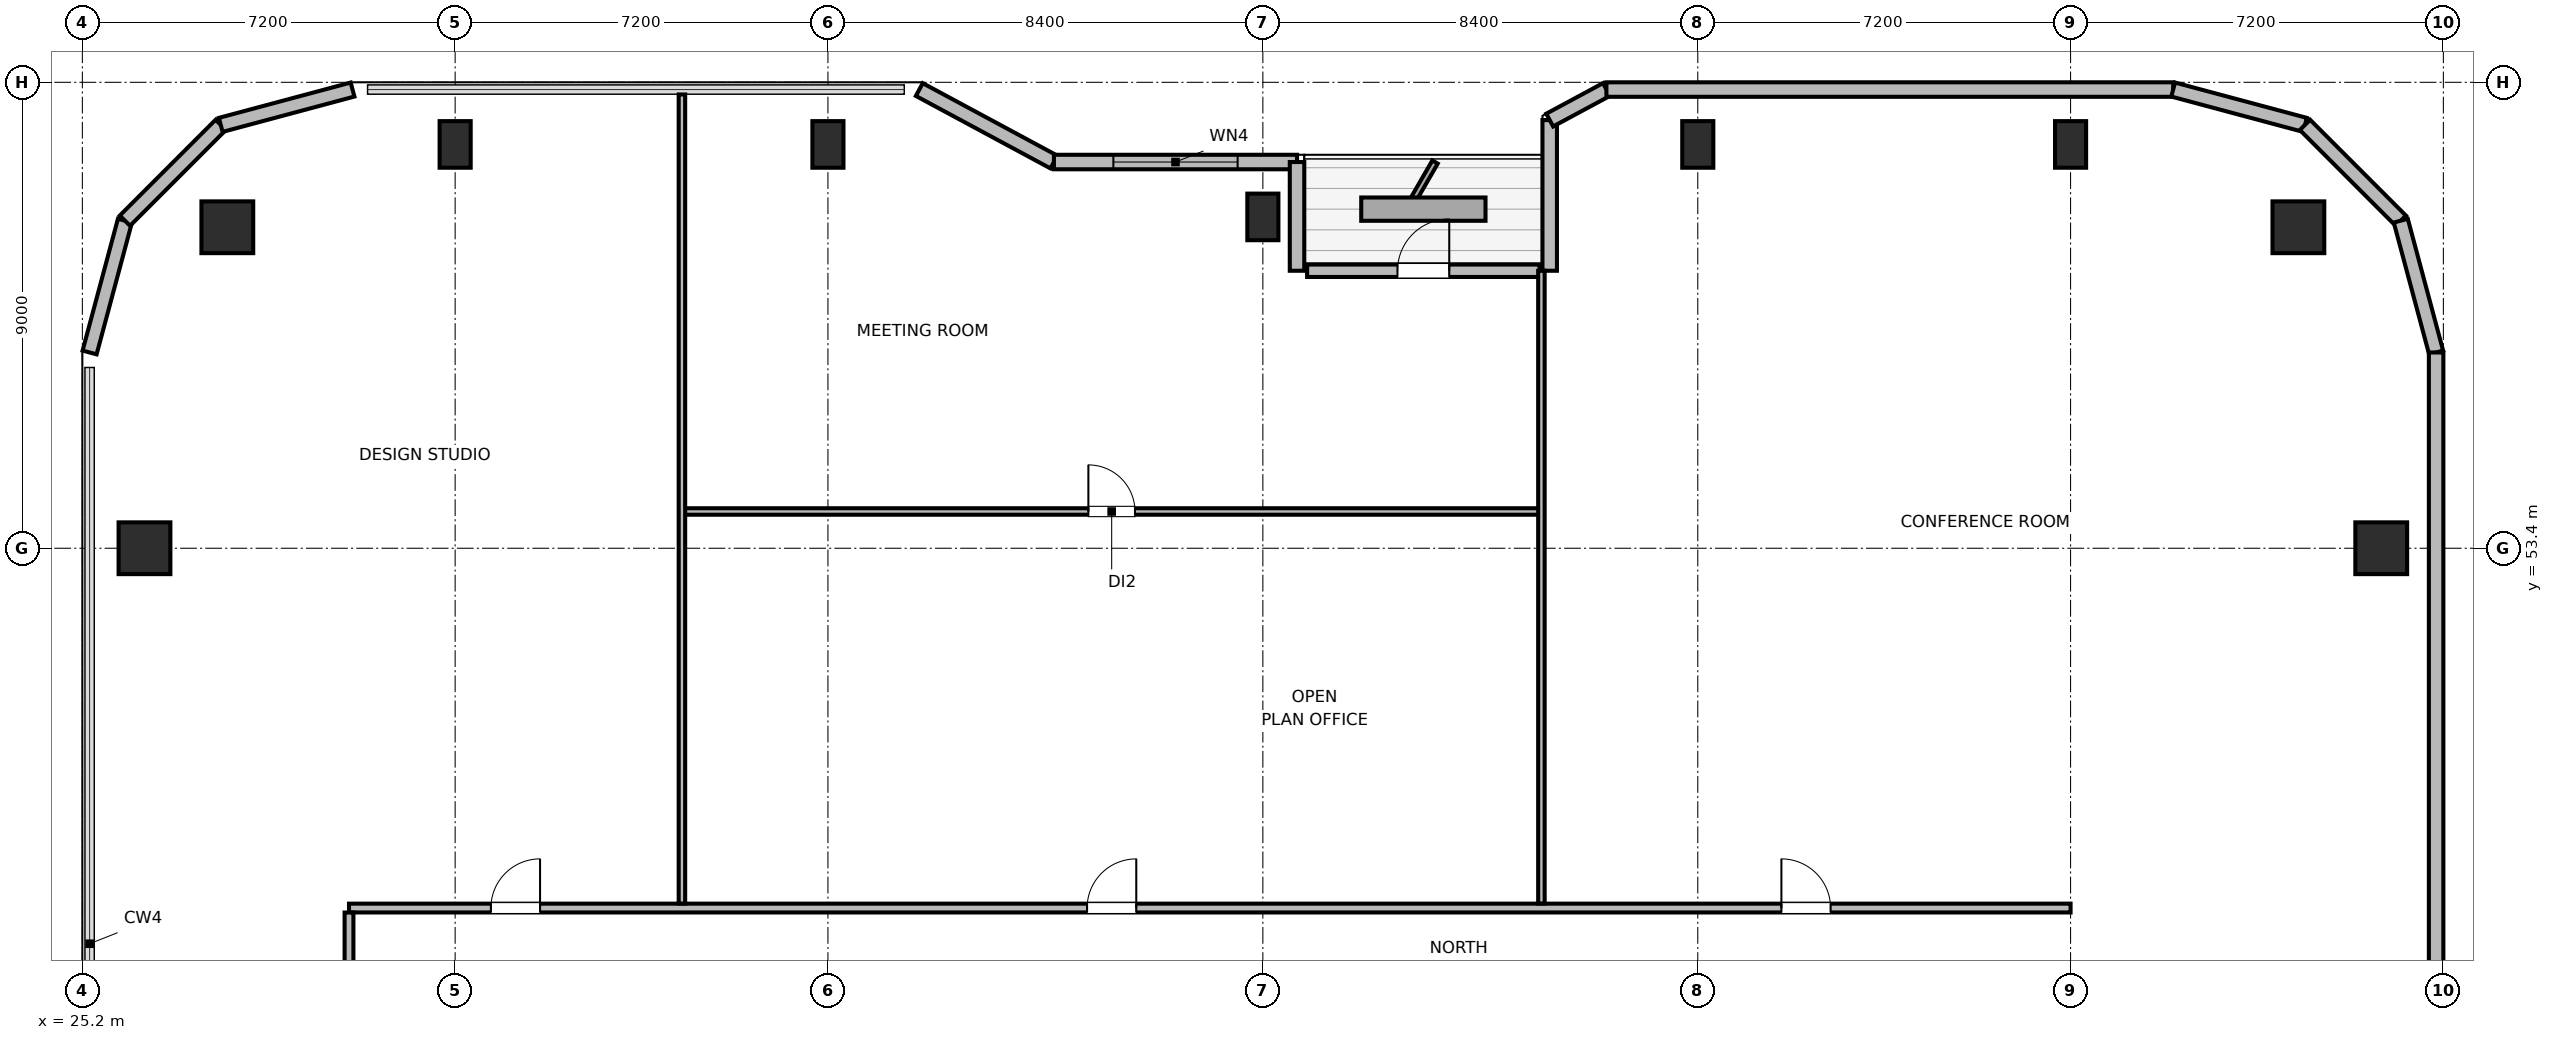
"""IFC4 building model, lengths in metres.
Left out: names, types, materials, properties, quantities, classifications, styles, units other than length and angle.
Written with IfcOpenShell. Run it as: python <this file> out.ifc"""

import sys

from ifc_helpers import new_model, si_unit, direction, frame, frame_2d, origin, origin_2d, place, context, subcontext, project, spatial, rectangle, circle, extrude, element, fill, save


model = new_model("IFC4")
c1 = context("Model", 3, precision=1e-05, world=origin(), true_north=direction((0.0, 1.0)))
c2 = subcontext(c1, "Body", "Model", "MODEL_VIEW")
j1 = project(units=[si_unit("LENGTHUNIT", "METRE"), si_unit("PLANEANGLEUNIT", "RADIAN")], contexts=[c1])
p1 = place(None, origin())
s1 = spatial("IfcSite", under=j1, at=p1, CompositionType="ELEMENT")
p2 = place(p1, origin())
s2 = spatial("IfcBuilding", under=s1, at=p2, CompositionType="ELEMENT")
p3 = place(p2, frame((0.0, 0.0, 231.0)))
s3 = spatial("IfcBuildingStorey", under=s2, at=p3, CompositionType="ELEMENT", Elevation=231.0)
for number, where, z_axis, x_axis in (
    (1, (68.0, 59.6, 0.0), (0.0, 0.0, 1.0), (1.0, 0.0, 0.0)),
    (2, (28.0, 59.6, 0.0), (0.0, 0.0, 1.0), (1.0, 0.0, 0.0)),
):
    element("IfcColumn", number, at=place(p3, frame(where, z_axis=z_axis, x_axis=x_axis)), inside=s3, PredefinedType="COLUMN", context=c2, shape_type="SweptSolid", body=[
        extrude(circle(Radius=0.5, at=origin_2d()), origin(), (0.0, 0.0, 1.0), 3.9),
    ])
for number, where, z_axis, x_axis in (
    (3, (32.4, 61.2, 0.0), (0.0, 0.0, 1.0), (1.0, 0.0, 0.0)),
    (4, (39.6, 61.2, 0.0), (0.0, 0.0, 1.0), (1.0, 0.0, 0.0)),
    (5, (48.0, 59.8, 0.0), (0.0, 0.0, 1.0), (1.0, 0.0, 0.0)),
    (6, (56.4, 61.2, 0.0), (0.0, 0.0, 1.0), (1.0, 0.0, 0.0)),
    (7, (63.6, 61.2, 0.0), (0.0, 0.0, 1.0), (1.0, 0.0, 0.0)),
):
    element("IfcColumn", number, at=place(p3, frame(where, z_axis=z_axis, x_axis=x_axis)), inside=s3, PredefinedType="COLUMN", context=c2, shape_type="SweptSolid", body=[
        extrude(rectangle(XDim=0.6, YDim=0.9, at=origin_2d()), origin(), (0.0, 0.0, 1.0), 3.9),
    ])
for number, where, z_axis, x_axis in (
    (8, (26.4, 53.4, 0.0), (0.0, 0.0, 1.0), (1.0, 0.0, 0.0)),
    (9, (69.6, 53.4, 0.0), (0.0, 0.0, 1.0), (1.0, 0.0, 0.0)),
):
    element("IfcColumn", number, at=place(p3, frame(where, z_axis=z_axis, x_axis=x_axis)), inside=s3, PredefinedType="COLUMN", context=c2, shape_type="SweptSolid", body=[
        extrude(rectangle(XDim=1.0, YDim=1.0, at=origin_2d()), origin(), (0.0, 0.0, 1.0), 3.9),
    ])
p4 = place(p3, frame((25.34, 57.182, 0.0), z_axis=(0.0, 0.0, 1.0), x_axis=(0.2588904131, 0.965906700466, 0.0)))
e10 = element("IfcWall", 10, at=p4, inside=s3, PredefinedType="SOLIDWALL", context=c2, shape_type="SweptSolid", body=[
    extrude(rectangle(XDim=2.636, YDim=0.28, at=frame_2d((1.318, 0.0))), origin(), (0.0, 0.0, 1.0), 3.68),
])
p5 = place(p3, frame((26.022, 59.728, 0.0), z_axis=(0.0, 0.0, 1.0), x_axis=(0.707153437963, 0.707060121331, 0.0)))
e11 = element("IfcWall", 11, at=p5, inside=s3, PredefinedType="SOLIDWALL", context=c2, shape_type="SweptSolid", body=[
    extrude(rectangle(XDim=2.616, YDim=0.28, at=frame_2d((1.308, 0.0))), origin(), (0.0, 0.0, 1.0), 3.68),
])
p6 = place(p3, frame((27.873, 61.577, 0.0), z_axis=(0.0, 0.0, 1.0), x_axis=(0.965883534663, 0.258976828051, 0.0)))
e12 = element("IfcWall", 12, at=p6, inside=s3, PredefinedType="SOLIDWALL", context=c2, shape_type="SweptSolid", body=[
    extrude(rectangle(XDim=2.636, YDim=0.28, at=frame_2d((1.318, 0.0))), origin(), (0.0, 0.0, 1.0), 3.68),
])
p7 = place(p3, frame((41.365, 62.26, 0.0), z_axis=(0.0, 0.0, 1.0), x_axis=(0.880473754814, -0.474094892488, 0.0)))
e13 = element("IfcWall", 13, at=p7, inside=s3, PredefinedType="SOLIDWALL", context=c2, shape_type="SweptSolid", body=[
    extrude(rectangle(XDim=2.953, YDim=0.28, at=frame_2d((1.477, 0.0))), origin(), (0.0, 0.0, 1.0), 2.265),
])
p8 = place(p3, frame((43.965, 60.86, 0.0), z_axis=(0.0, 0.0, 1.0), x_axis=(1.0, 0.0, 0.0)))
e14 = element("IfcWall", 14, at=p8, inside=s3, PredefinedType="SOLIDWALL", context=c2, shape_type="SweptSolid", body=[
    extrude(rectangle(XDim=4.695, YDim=0.28, at=frame_2d((2.348, 0.0))), origin(), (0.0, 0.0, 1.0), 2.265),
])
p9 = place(p8, frame((1.148, 0.0, 0.85)))
e15 = element("IfcOpeningElement", 15, at=p9, cuts=e14, PredefinedType="OPENING", context=c2, shape_type="SweptSolid", body=[
    extrude(rectangle(XDim=2.4, YDim=1.15, at=frame_2d((1.2, 0.575))), frame((0.0, 0.15, 0.0), z_axis=(0.0, -1.0, 0.0), x_axis=(1.0, 0.0, 0.0)), (0.0, 0.0, 1.0), 0.3),
])
p10 = place(p3, frame((48.66, 60.86, 0.0), z_axis=(0.0, 0.0, 1.0), x_axis=(0.0, -1.0, 0.0)))
e16 = element("IfcWall", 16, at=p10, inside=s3, PredefinedType="SOLIDWALL", context=c2, shape_type="SweptSolid", body=[
    extrude(rectangle(XDim=2.1, YDim=0.28, at=frame_2d((1.05, 0.0))), origin(), (0.0, 0.0, 1.0), 2.265),
])
p11 = place(p3, frame((48.855, 58.76, 0.0), z_axis=(0.0, 0.0, 1.0), x_axis=(1.0, 0.0, 0.0)))
e17 = element("IfcWall", 17, at=p11, inside=s3, PredefinedType="SOLIDWALL", context=c2, shape_type="SweptSolid", body=[
    extrude(rectangle(XDim=4.49, YDim=0.24, at=frame_2d((2.245, 0.0))), origin(), (0.0, 0.0, 1.0), 3.68),
])
p12 = place(p11, frame((1.745, 0.0, 0.0)))
e18 = element("IfcOpeningElement", 18, at=p12, cuts=e17, PredefinedType="OPENING", context=c2, shape_type="SweptSolid", body=[
    extrude(rectangle(XDim=1.0, YDim=2.02, at=frame_2d((0.5, 1.01))), frame((0.0, 0.13, 0.0), z_axis=(0.0, -1.0, 0.0), x_axis=(1.0, 0.0, 0.0)), (0.0, 0.0, 1.0), 0.26),
])
p13 = place(p3, frame((53.54, 58.76, 0.0), z_axis=(0.0, 0.0, 1.0), x_axis=(0.0, 1.0, 0.0)))
e19 = element("IfcWall", 19, at=p13, inside=s3, PredefinedType="SOLIDWALL", context=c2, shape_type="SweptSolid", body=[
    extrude(rectangle(XDim=2.91, YDim=0.28, at=frame_2d((1.455, 0.0))), origin(), (0.0, 0.0, 1.0), 2.265),
])
p14 = place(p3, frame((53.54, 61.67, 0.0), z_axis=(0.0, 0.0, 1.0), x_axis=(0.880515214249, 0.474017887296, 0.0)))
e20 = element("IfcWall", 20, at=p14, inside=s3, PredefinedType="SOLIDWALL", context=c2, shape_type="SweptSolid", body=[
    extrude(rectangle(XDim=1.244, YDim=0.28, at=frame_2d((0.622, 0.0))), origin(), (0.0, 0.0, 1.0), 3.68),
])
p15 = place(p3, frame((54.635, 62.26, 0.0), z_axis=(0.0, 0.0, 1.0), x_axis=(1.0, 0.0, 0.0)))
e21 = element("IfcWall", 21, at=p15, inside=s3, PredefinedType="SOLIDWALL", context=c2, shape_type="SweptSolid", body=[
    extrude(rectangle(XDim=10.946, YDim=0.28, at=frame_2d((5.473, 0.0))), origin(), (0.0, 0.0, 1.0), 3.68),
])
p16 = place(p3, frame((65.582, 62.26, 0.0), z_axis=(0.0, 0.0, 1.0), x_axis=(0.965883534663, -0.258976828051, 0.0)))
e22 = element("IfcWall", 22, at=p16, inside=s3, PredefinedType="SOLIDWALL", context=c2, shape_type="SweptSolid", body=[
    extrude(rectangle(XDim=2.636, YDim=0.28, at=frame_2d((1.318, 0.0))), origin(), (0.0, 0.0, 1.0), 3.68),
])
p17 = place(p3, frame((68.127, 61.577, 0.0), z_axis=(0.0, 0.0, 1.0), x_axis=(0.707153437963, -0.707060121331, 0.0)))
e23 = element("IfcWall", 23, at=p17, inside=s3, PredefinedType="SOLIDWALL", context=c2, shape_type="SweptSolid", body=[
    extrude(rectangle(XDim=2.616, YDim=0.28, at=frame_2d((1.308, 0.0))), origin(), (0.0, 0.0, 1.0), 3.68),
])
p18 = place(p3, frame((69.978, 59.728, 0.0), z_axis=(0.0, 0.0, 1.0), x_axis=(0.2588904131, -0.965906700466, 0.0)))
e24 = element("IfcWall", 24, at=p18, inside=s3, PredefinedType="SOLIDWALL", context=c2, shape_type="SweptSolid", body=[
    extrude(rectangle(XDim=2.636, YDim=0.28, at=frame_2d((1.318, 0.0))), origin(), (0.0, 0.0, 1.0), 3.68),
])
p19 = place(p3, frame((70.66, 57.182, 0.0), z_axis=(0.0, 0.0, 1.0), x_axis=(0.0, -1.0, 0.0)))
e25 = element("IfcWall", 25, at=p19, inside=s3, PredefinedType="SOLIDWALL", context=c2, shape_type="SweptSolid", body=[
    extrude(rectangle(XDim=14.442, YDim=0.28, at=frame_2d((7.221, 0.0))), origin(), (0.0, 0.0, 1.0), 3.68),
])
p20 = place(p3, frame((30.35, 46.45, 0.0), z_axis=(0.0, 0.0, 1.0), x_axis=(1.0, 0.0, 0.0)))
e26 = element("IfcWall", 26, at=p20, inside=s3, PredefinedType="PARTITIONING", context=c2, shape_type="SweptSolid", body=[
    extrude(rectangle(XDim=33.25, YDim=0.17, at=frame_2d((16.625, 0.0))), origin(), (0.0, 0.0, 1.0), 3.68),
])
p21 = place(p20, frame((2.74, 0.0, 0.0)))
e27 = element("IfcOpeningElement", 27, at=p21, cuts=e26, PredefinedType="OPENING", context=c2, shape_type="SweptSolid", body=[
    extrude(rectangle(XDim=0.95, YDim=2.04, at=frame_2d((0.475, 1.02))), frame((0.0, 0.095, 0.0), z_axis=(0.0, -1.0, 0.0), x_axis=(1.0, 0.0, 0.0)), (0.0, 0.0, 1.0), 0.19),
])
p22 = place(p20, frame((14.255, 0.0, 0.0)))
e28 = element("IfcOpeningElement", 28, at=p22, cuts=e26, PredefinedType="OPENING", context=c2, shape_type="SweptSolid", body=[
    extrude(rectangle(XDim=0.95, YDim=2.04, at=frame_2d((0.475, 1.02))), frame((0.0, 0.095, 0.0), z_axis=(0.0, -1.0, 0.0), x_axis=(1.0, 0.0, 0.0)), (0.0, 0.0, 1.0), 0.19),
])
p23 = place(p20, frame((27.665, 0.0, 0.0)))
e29 = element("IfcOpeningElement", 29, at=p23, cuts=e26, PredefinedType="OPENING", context=c2, shape_type="SweptSolid", body=[
    extrude(rectangle(XDim=0.95, YDim=2.04, at=frame_2d((0.475, 1.02))), frame((0.0, 0.095, 0.0), z_axis=(0.0, -1.0, 0.0), x_axis=(1.0, 0.0, 0.0)), (0.0, 0.0, 1.0), 0.19),
])
p24 = place(p3, frame((30.35, 25.637, 0.0), z_axis=(0.0, 0.0, 1.0), x_axis=(0.0, 1.0, 0.0)))
e30 = element("IfcWall", 30, at=p24, inside=s3, PredefinedType="PARTITIONING", context=c2, shape_type="SweptSolid", body=[
    extrude(rectangle(XDim=20.726, YDim=0.17, at=frame_2d((10.363, 0.0))), origin(), (0.0, 0.0, 1.0), 3.68),
])
p25 = place(p24, frame((9.888, 0.0, 0.0)))
e31 = element("IfcOpeningElement", 31, at=p25, cuts=e30, PredefinedType="OPENING", context=c2, shape_type="SweptSolid", body=[
    extrude(rectangle(XDim=0.95, YDim=2.04, at=frame_2d((0.475, 1.02))), frame((0.0, 0.095, 0.0), z_axis=(0.0, -1.0, 0.0), x_axis=(1.0, 0.0, 0.0)), (0.0, 0.0, 1.0), 0.19),
])
p26 = place(p3, frame((36.78, 54.11, 0.0), z_axis=(0.0, 0.0, 1.0), x_axis=(1.0, 0.0, 0.0)))
e32 = element("IfcWall", 32, at=p26, inside=s3, PredefinedType="PARTITIONING", context=c2, shape_type="SweptSolid", body=[
    extrude(rectangle(XDim=16.6, YDim=0.125, at=frame_2d((8.3, 0.0))), origin(), (0.0, 0.0, 1.0), 3.68),
])
p27 = place(p26, frame((7.85, 0.0, 0.0)))
e33 = element("IfcOpeningElement", 33, at=p27, cuts=e32, PredefinedType="OPENING", context=c2, shape_type="SweptSolid", body=[
    extrude(rectangle(XDim=0.9, YDim=2.02, at=frame_2d((0.45, 1.01))), frame((0.0, 0.073, 0.0), z_axis=(0.0, -1.0, 0.0), x_axis=(1.0, 0.0, 0.0)), (0.0, 0.0, 1.0), 0.145),
])
p28 = place(p3, frame((36.78, 46.537, 0.0), z_axis=(0.0, 0.0, 1.0), x_axis=(0.0, 1.0, 0.0)))
e34 = element("IfcWall", 34, at=p28, inside=s3, PredefinedType="PARTITIONING", context=c2, shape_type="SweptSolid", body=[
    extrude(rectangle(XDim=15.628, YDim=0.125, at=frame_2d((7.814, 0.0))), origin(), (0.0, 0.0, 1.0), 3.68),
])
p29 = place(p3, frame((53.38, 46.537, 0.0), z_axis=(0.0, 0.0, 1.0), x_axis=(0.0, 1.0, 0.0)))
e35 = element("IfcWall", 35, at=p29, inside=s3, PredefinedType="PARTITIONING", context=c2, shape_type="SweptSolid", body=[
    extrude(rectangle(XDim=12.223, YDim=0.125, at=frame_2d((6.111, 0.0))), origin(), (0.0, 0.0, 1.0), 3.043),
])
p30 = place(p9, origin())
e36 = element("IfcWindow", 36, at=p30, inside=s3, PartitioningType="SINGLE_PANEL", PredefinedType="WINDOW", context=c2, shape_type="SweptSolid", body=[
    extrude(rectangle(XDim=2.4, YDim=1.15, at=frame_2d((1.2, 0.575))), frame((0.0, 0.03, 0.0), z_axis=(0.0, -1.0, 0.0), x_axis=(1.0, 0.0, 0.0)), (0.0, 0.0, 1.0), 0.06),
])
fill(e15, e36)
p31 = place(p12, origin())
e37 = element("IfcDoor", 37, at=p31, inside=s3, OperationType="SINGLE_SWING_RIGHT", PredefinedType="DOOR", context=c2, shape_type="SweptSolid", body=[
    extrude(rectangle(XDim=1.0, YDim=2.02, at=frame_2d((0.5, 1.01))), frame((0.0, 0.025, 0.0), z_axis=(0.0, -1.0, 0.0), x_axis=(1.0, 0.0, 0.0)), (0.0, 0.0, 1.0), 0.05),
])
fill(e18, e37)
p32 = place(p21, origin())
e38 = element("IfcDoor", 38, at=p32, inside=s3, OperationType="SINGLE_SWING_RIGHT", PredefinedType="DOOR", context=c2, shape_type="SweptSolid", body=[
    extrude(rectangle(XDim=0.95, YDim=2.04, at=frame_2d((0.475, 1.02))), frame((0.0, 0.025, 0.0), z_axis=(0.0, -1.0, 0.0), x_axis=(1.0, 0.0, 0.0)), (0.0, 0.0, 1.0), 0.05),
])
fill(e27, e38)
p33 = place(p27, origin())
e39 = element("IfcDoor", 39, at=p33, inside=s3, OperationType="SINGLE_SWING_LEFT", PredefinedType="DOOR", context=c2, shape_type="SweptSolid", body=[
    extrude(rectangle(XDim=0.9, YDim=2.02, at=frame_2d((0.45, 1.01))), frame((0.0, 0.025, 0.0), z_axis=(0.0, -1.0, 0.0), x_axis=(1.0, 0.0, 0.0)), (0.0, 0.0, 1.0), 0.05),
])
fill(e33, e39)
p34 = place(p22, origin())
e40 = element("IfcDoor", 40, at=p34, inside=s3, OperationType="SINGLE_SWING_RIGHT", PredefinedType="DOOR", context=c2, shape_type="SweptSolid", body=[
    extrude(rectangle(XDim=0.95, YDim=2.04, at=frame_2d((0.475, 1.02))), frame((0.0, 0.025, 0.0), z_axis=(0.0, -1.0, 0.0), x_axis=(1.0, 0.0, 0.0)), (0.0, 0.0, 1.0), 0.05),
])
fill(e28, e40)
p35 = place(p23, origin())
e41 = element("IfcDoor", 41, at=p35, inside=s3, OperationType="SINGLE_SWING_LEFT", PredefinedType="DOOR", context=c2, shape_type="SweptSolid", body=[
    extrude(rectangle(XDim=0.95, YDim=2.04, at=frame_2d((0.475, 1.02))), frame((0.0, 0.025, 0.0), z_axis=(0.0, -1.0, 0.0), x_axis=(1.0, 0.0, 0.0)), (0.0, 0.0, 1.0), 0.05),
])
fill(e29, e41)
save(model, sys.argv[1])
